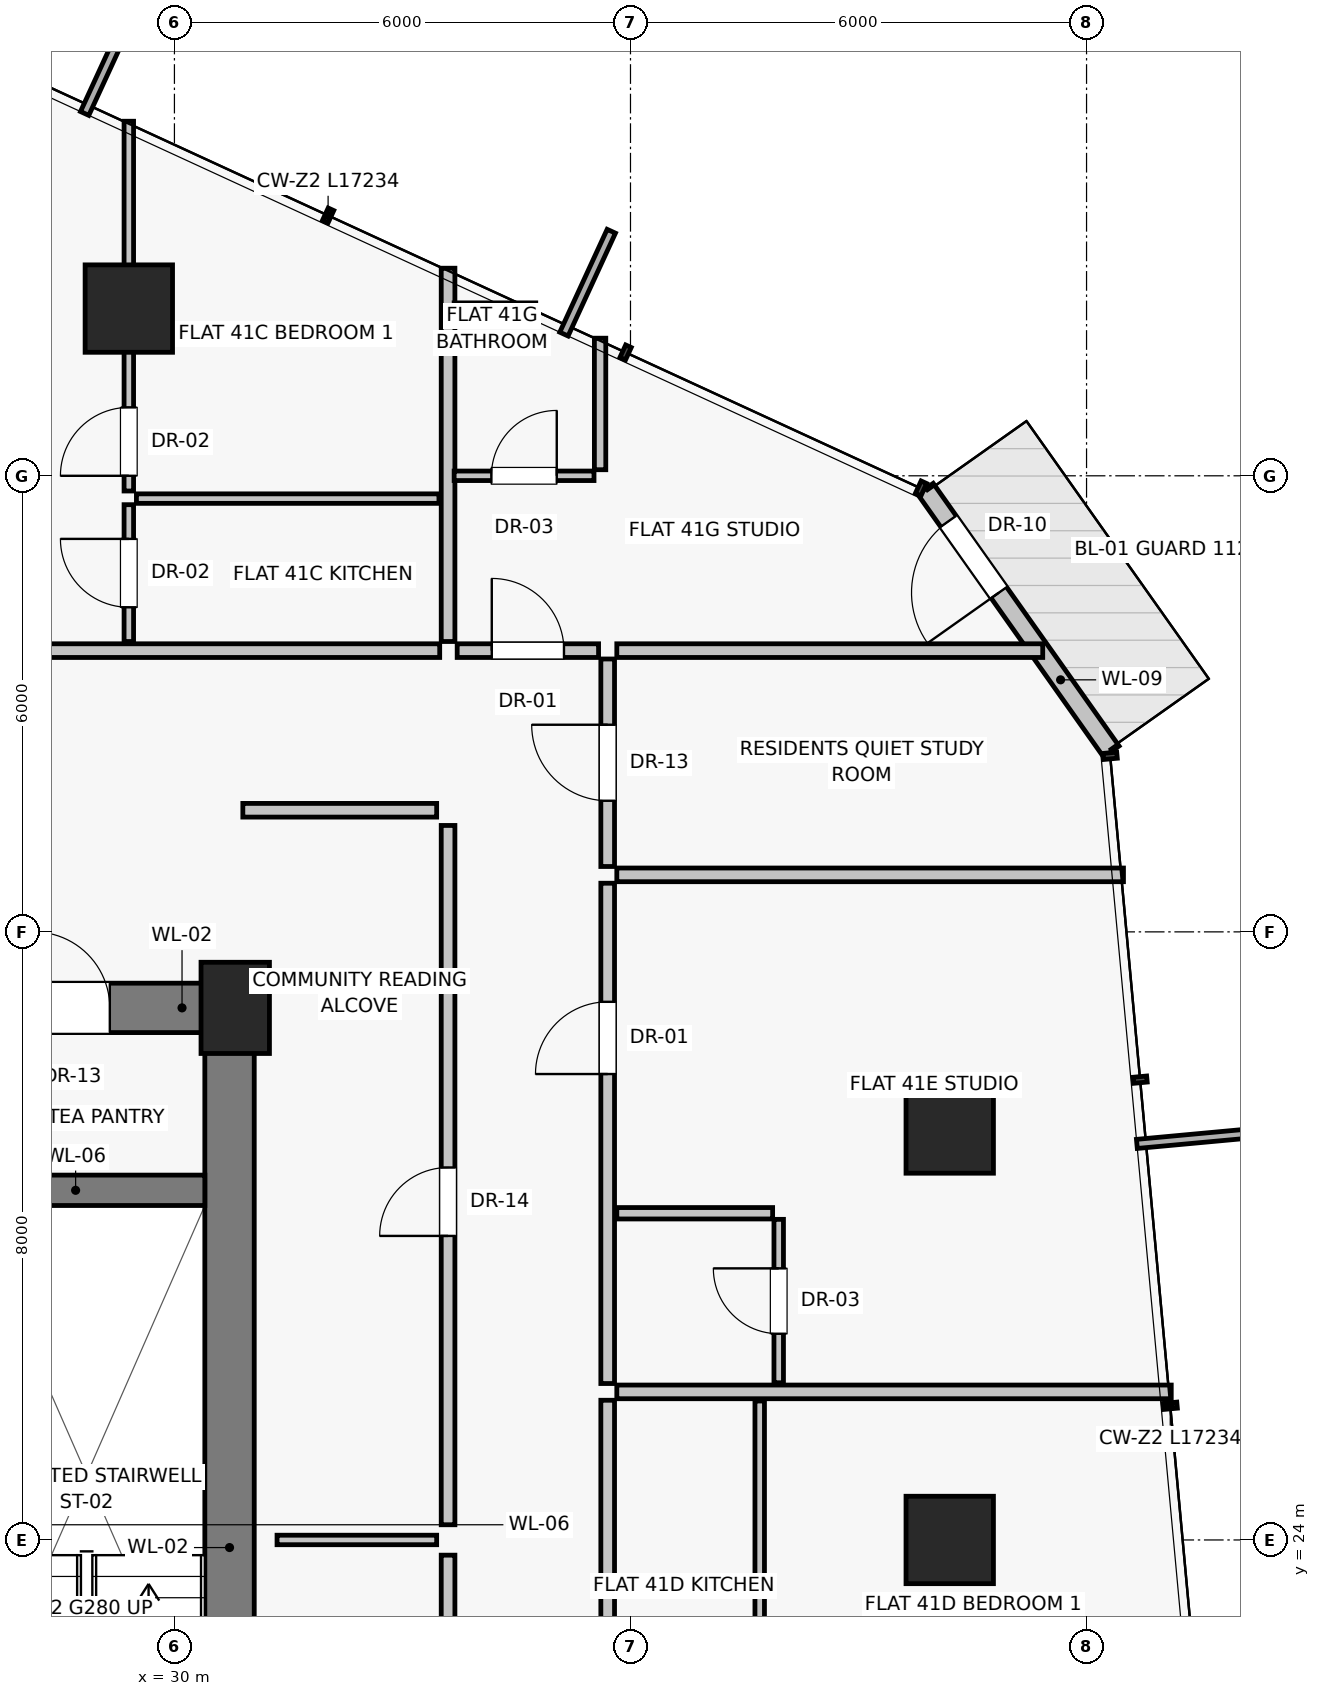
"""IFC4 building model, lengths in metres.
Left out: names, types, materials, properties, quantities, classifications, styles, units other than length and angle.
Written with IfcOpenShell. Run it as: python <this file> out.ifc"""

import sys

from ifc_helpers import new_model, si_unit, direction, frame, frame_2d, origin, origin_2d, place, context, subcontext, project, spatial, rectangle, extrude, source, transform, mapped, element, fill, save


model = new_model("IFC4")
c1 = context("Model", 3, precision=1e-05, world=origin(), true_north=direction((0.0, 1.0)))
c2 = subcontext(c1, "Body", "Model", "MODEL_VIEW")
j1 = project(units=[si_unit("LENGTHUNIT", "METRE"), si_unit("PLANEANGLEUNIT", "RADIAN")], contexts=[c1])
p1 = place(None, origin())
s1 = spatial("IfcSite", under=j1, at=p1, CompositionType="ELEMENT")
p2 = place(p1, origin())
s2 = spatial("IfcBuilding", under=s1, at=p2, CompositionType="ELEMENT")
p3 = place(p2, frame((0.0, 0.0, 145.75)))
s3 = spatial("IfcBuildingStorey", under=s2, at=p3, CompositionType="ELEMENT", Elevation=145.75)
p4 = place(p3, frame((30.8, 31.0, 0.0), z_axis=(0.0, 0.0, 1.0), x_axis=(1.0, 0.0, 0.0)))
e1 = element("IfcColumn", 1, at=p4, inside=s3, PredefinedType="PILASTER", context=c2, shape_type="SweptSolid", body=[
    extrude(rectangle(XDim=0.9, YDim=1.2, at=origin_2d()), origin(), (0.0, 0.0, 1.0), 3.25),
])
for number, where, z_axis, x_axis in (
    (2, (40.2, 24.0, 0.0), (0.0, 0.0, 1.0), (1.0, 0.0, 0.0)),
    (3, (40.2, 29.4, 0.0), (0.0, 0.0, 1.0), (1.0, 0.0, 0.0)),
    (4, (29.4, 40.2, 0.0), (0.0, 0.0, 1.0), (1.0, 0.0, 0.0)),
):
    element("IfcColumn", number, at=place(p3, frame(where, z_axis=z_axis, x_axis=x_axis)), inside=s3, PredefinedType="COLUMN", context=c2, shape_type="SweptSolid", body=[
        extrude(rectangle(XDim=1.15, YDim=1.15, at=origin_2d()), origin(), (0.0, 0.0, 1.0), 3.25),
    ])
p5 = place(p3, frame((42.326, 34.373, 0.0), z_axis=(0.0, 0.0, 1.0), x_axis=(-0.577577222035, 0.81633605371, 0.0)))
e5 = element("IfcWall", 5, at=p5, inside=s3, PredefinedType="SOLIDWALL", context=c2, shape_type="SweptSolid", body=[
    extrude(rectangle(XDim=4.233, YDim=0.25, at=frame_2d((2.117, 0.0))), origin(), (0.0, 0.0, 1.0), 3.0),
])
p6 = place(p5, frame((2.56, 0.0, 0.0)))
e6 = element("IfcOpeningElement", 6, at=p6, cuts=e5, PredefinedType="OPENING", context=c2, shape_type="SweptSolid", body=[
    extrude(rectangle(XDim=1.15, YDim=2.25, at=frame_2d((0.575, 1.125))), frame((0.0, 0.135, 0.0), z_axis=(0.0, -1.0, 0.0), x_axis=(1.0, 0.0, 0.0)), (0.0, 0.0, 1.0), 0.27),
])
p7 = place(p3, frame((30.725, 16.8, 0.0), z_axis=(0.0, 0.0, 1.0), x_axis=(0.0, 1.0, 0.0)))
e7 = element("IfcWall", 7, at=p7, inside=s3, PredefinedType="SHEAR", context=c2, shape_type="SweptSolid", body=[
    extrude(rectangle(XDim=14.2, YDim=0.65, at=frame_2d((7.1, 0.0))), origin(), (0.0, 0.0, 1.0), 3.0),
])
p8 = place(p3, frame((27.0, 31.0, 0.0), z_axis=(0.0, 0.0, 1.0), x_axis=(1.0, 0.0, 0.0)))
e8 = element("IfcWall", 8, at=p8, inside=s3, PredefinedType="SHEAR", context=c2, shape_type="SweptSolid", body=[
    extrude(rectangle(XDim=3.8, YDim=0.65, at=frame_2d((1.9, 0.0))), origin(), (0.0, 0.0, 1.0), 3.0),
])
p9 = place(p8, frame((1.15, 0.0, 0.0)))
e9 = element("IfcOpeningElement", 9, at=p9, cuts=e8, PredefinedType="OPENING", context=c2, shape_type="SweptSolid", body=[
    extrude(rectangle(XDim=1.0, YDim=2.01, at=frame_2d((0.5, 1.005))), frame((0.0, 0.335, 0.0), z_axis=(0.0, -1.0, 0.0), x_axis=(1.0, 0.0, 0.0)), (0.0, 0.0, 1.0), 0.67),
])
p10 = place(p3, frame((27.0, 28.6, 0.0), z_axis=(0.0, 0.0, 1.0), x_axis=(1.0, 0.0, 0.0)))
e10 = element("IfcWall", 10, at=p10, inside=s3, PredefinedType="SHEAR", context=c2, shape_type="SweptSolid", body=[
    extrude(rectangle(XDim=3.4, YDim=0.4, at=frame_2d((1.7, 0.0))), origin(), (0.0, 0.0, 1.0), 3.0),
])
p11 = place(p3, frame((33.6, 14.4, 0.0), z_axis=(0.0, 0.0, 1.0), x_axis=(0.0, 1.0, 0.0)))
e11 = element("IfcWall", 11, at=p11, inside=s3, PredefinedType="PARTITIONING", context=c2, shape_type="SweptSolid", body=[
    extrude(rectangle(XDim=9.4, YDim=0.18, at=frame_2d((4.7, 0.0))), origin(), (0.0, 0.0, 1.0), 3.0),
])
p12 = place(p11, frame((3.8, 0.0, 0.0)))
e12 = element("IfcOpeningElement", 12, at=p12, cuts=e11, PredefinedType="OPENING", context=c2, shape_type="SweptSolid", body=[
    extrude(rectangle(XDim=0.9, YDim=2.01, at=frame_2d((0.45, 1.005))), frame((0.0, 0.1, 0.0), z_axis=(0.0, -1.0, 0.0), x_axis=(1.0, 0.0, 0.0)), (0.0, 0.0, 1.0), 0.2),
])
p13 = place(p3, frame((33.6, 24.2, 0.0), z_axis=(0.0, 0.0, 1.0), x_axis=(0.0, 1.0, 0.0)))
e13 = element("IfcWall", 13, at=p13, inside=s3, PredefinedType="PARTITIONING", context=c2, shape_type="SweptSolid", body=[
    extrude(rectangle(XDim=9.2, YDim=0.18, at=frame_2d((4.6, 0.0))), origin(), (0.0, 0.0, 1.0), 3.0),
])
p14 = place(p13, frame((3.8, 0.0, 0.0)))
e14 = element("IfcOpeningElement", 14, at=p14, cuts=e13, PredefinedType="OPENING", context=c2, shape_type="SweptSolid", body=[
    extrude(rectangle(XDim=0.9, YDim=2.01, at=frame_2d((0.45, 1.005))), frame((0.0, 0.1, 0.0), z_axis=(0.0, -1.0, 0.0), x_axis=(1.0, 0.0, 0.0)), (0.0, 0.0, 1.0), 0.2),
])
p15 = place(p3, frame((31.35, 24.0, 0.0), z_axis=(0.0, 0.0, 1.0), x_axis=(1.0, 0.0, 0.0)))
e15 = element("IfcWall", 15, at=p15, inside=s3, PredefinedType="PARTITIONING", context=c2, shape_type="SweptSolid", body=[
    extrude(rectangle(XDim=2.1, YDim=0.125, at=frame_2d((1.05, 0.0))), origin(), (0.0, 0.0, 1.0), 3.0),
])
p16 = place(p3, frame((30.9, 33.6, 0.0), z_axis=(0.0, 0.0, 1.0), x_axis=(1.0, 0.0, 0.0)))
e16 = element("IfcWall", 16, at=p16, inside=s3, PredefinedType="PARTITIONING", context=c2, shape_type="SweptSolid", body=[
    extrude(rectangle(XDim=2.55, YDim=0.18, at=frame_2d((1.275, 0.0))), origin(), (0.0, 0.0, 1.0), 3.0),
])
p17 = place(p3, frame((33.6, 35.82, 0.0), z_axis=(0.0, 0.0, 1.0), x_axis=(0.0, 1.0, 0.0)))
e17 = element("IfcWall", 17, at=p17, inside=s3, PredefinedType="PARTITIONING", context=c2, shape_type="SweptSolid", body=[
    extrude(rectangle(XDim=4.911, YDim=0.18, at=frame_2d((2.456, 0.0))), origin(), (0.0, 0.0, 1.0), 3.0),
])
p18 = place(p3, frame((18.71, 35.7, 0.0), z_axis=(0.0, 0.0, 1.0), x_axis=(1.0, 0.0, 0.0)))
e18 = element("IfcWall", 18, at=p18, inside=s3, PredefinedType="PARTITIONING", context=c2, shape_type="SweptSolid", body=[
    extrude(rectangle(XDim=14.78, YDim=0.18, at=frame_2d((7.39, 0.0))), origin(), (0.0, 0.0, 1.0), 2.58),
])
p19 = place(p18, frame((5.94, 0.0, 0.0)))
e19 = element("IfcOpeningElement", 19, at=p19, cuts=e18, PredefinedType="OPENING", context=c2, shape_type="SweptSolid", body=[
    extrude(rectangle(XDim=0.95, YDim=2.02, at=frame_2d((0.475, 1.01))), frame((0.0, 0.1, 0.0), z_axis=(0.0, -1.0, 0.0), x_axis=(1.0, 0.0, 0.0)), (0.0, 0.0, 1.0), 0.2),
])
p20 = place(p3, frame((29.4, 35.82, 0.0), z_axis=(0.0, 0.0, 1.0), x_axis=(0.0, 1.0, 0.0)))
e20 = element("IfcWall", 20, at=p20, inside=s3, PredefinedType="PARTITIONING", context=c2, shape_type="SweptSolid", body=[
    extrude(rectangle(XDim=1.8, YDim=0.125, at=frame_2d((0.9, 0.0))), origin(), (0.0, 0.0, 1.0), 2.378),
])
p21 = place(p20, frame((0.45, 0.0, 0.0)))
e21 = element("IfcOpeningElement", 21, at=p21, cuts=e20, PredefinedType="OPENING", context=c2, shape_type="SweptSolid", body=[
    extrude(rectangle(XDim=0.9, YDim=2.01, at=frame_2d((0.45, 1.005))), frame((0.0, 0.073, 0.0), z_axis=(0.0, -1.0, 0.0), x_axis=(1.0, 0.0, 0.0)), (0.0, 0.0, 1.0), 0.145),
])
p22 = place(p3, frame((29.5, 37.7, 0.0), z_axis=(0.0, 0.0, 1.0), x_axis=(1.0, 0.0, 0.0)))
e22 = element("IfcWall", 22, at=p22, inside=s3, PredefinedType="PARTITIONING", context=c2, shape_type="SweptSolid", body=[
    extrude(rectangle(XDim=3.98, YDim=0.125, at=frame_2d((1.99, 0.0))), origin(), (0.0, 0.0, 1.0), 3.0),
])
p23 = place(p3, frame((29.4, 37.8, 0.0), z_axis=(0.0, 0.0, 1.0), x_axis=(0.0, 1.0, 0.0)))
e23 = element("IfcWall", 23, at=p23, inside=s3, PredefinedType="PARTITIONING", context=c2, shape_type="SweptSolid", body=[
    extrude(rectangle(XDim=4.865, YDim=0.125, at=frame_2d((2.432, 0.0))), origin(), (0.0, 0.0, 1.0), 2.378),
])
p24 = place(p23, frame((0.2, 0.0, 0.0)))
e24 = element("IfcOpeningElement", 24, at=p24, cuts=e23, PredefinedType="OPENING", context=c2, shape_type="SweptSolid", body=[
    extrude(rectangle(XDim=0.9, YDim=2.01, at=frame_2d((0.45, 1.005))), frame((0.0, 0.073, 0.0), z_axis=(0.0, -1.0, 0.0), x_axis=(1.0, 0.0, 0.0)), (0.0, 0.0, 1.0), 0.145),
])
p25 = place(p3, frame((35.82, 35.7, 0.0), z_axis=(0.0, 0.0, 1.0), x_axis=(1.0, 0.0, 0.0)))
e25 = element("IfcWall", 25, at=p25, inside=s3, PredefinedType="PARTITIONING", context=c2, shape_type="SweptSolid", body=[
    extrude(rectangle(XDim=5.604, YDim=0.18, at=frame_2d((2.802, 0.0))), origin(), (0.0, 0.0, 1.0), 3.0),
])
p26 = place(p3, frame((35.7, 12.21, 0.0), z_axis=(0.0, 0.0, 1.0), x_axis=(0.0, 1.0, 0.0)))
e26 = element("IfcWall", 26, at=p26, inside=s3, PredefinedType="PARTITIONING", context=c2, shape_type="SweptSolid", body=[
    extrude(rectangle(XDim=13.628, YDim=0.18, at=frame_2d((6.814, 0.0))), origin(), (0.0, 0.0, 1.0), 2.58),
])
p27 = place(p26, frame((4.348, 0.0, 0.0)))
e27 = element("IfcOpeningElement", 27, at=p27, cuts=e26, PredefinedType="OPENING", context=c2, shape_type="SweptSolid", body=[
    extrude(rectangle(XDim=0.95, YDim=2.02, at=frame_2d((0.475, 1.01))), frame((0.0, 0.1, 0.0), z_axis=(0.0, -1.0, 0.0), x_axis=(1.0, 0.0, 0.0)), (0.0, 0.0, 1.0), 0.2),
])
p28 = place(p3, frame((37.7, 19.816, 0.0), z_axis=(0.0, 0.0, 1.0), x_axis=(0.0, 1.0, 0.0)))
e28 = element("IfcWall", 28, at=p28, inside=s3, PredefinedType="PARTITIONING", context=c2, shape_type="SweptSolid", body=[
    extrude(rectangle(XDim=6.012, YDim=0.125, at=frame_2d((3.006, 0.0))), origin(), (0.0, 0.0, 1.0), 3.0),
])
p29 = place(p3, frame((35.82, 25.948, 0.0), z_axis=(0.0, 0.0, 1.0), x_axis=(1.0, 0.0, 0.0)))
e29 = element("IfcWall", 29, at=p29, inside=s3, PredefinedType="PARTITIONING", context=c2, shape_type="SweptSolid", body=[
    extrude(rectangle(XDim=7.294, YDim=0.18, at=frame_2d((3.647, 0.0))), origin(), (0.0, 0.0, 1.0), 3.0),
])
p30 = place(p3, frame((35.7, 32.86, 0.0), z_axis=(0.0, 0.0, 1.0), x_axis=(0.0, 1.0, 0.0)))
e30 = element("IfcWall", 30, at=p30, inside=s3, PredefinedType="PARTITIONING", context=c2, shape_type="SweptSolid", body=[
    extrude(rectangle(XDim=2.73, YDim=0.18, at=frame_2d((1.365, 0.0))), origin(), (0.0, 0.0, 1.0), 3.0),
])
p31 = place(p30, frame((0.865, 0.0, 0.0)))
e31 = element("IfcOpeningElement", 31, at=p31, cuts=e30, PredefinedType="OPENING", context=c2, shape_type="SweptSolid", body=[
    extrude(rectangle(XDim=1.0, YDim=2.01, at=frame_2d((0.5, 1.005))), frame((0.0, 0.1, 0.0), z_axis=(0.0, -1.0, 0.0), x_axis=(1.0, 0.0, 0.0)), (0.0, 0.0, 1.0), 0.2),
])
p32 = place(p3, frame((35.82, 32.75, 0.0), z_axis=(0.0, 0.0, 1.0), x_axis=(1.0, 0.0, 0.0)))
e32 = element("IfcWall", 32, at=p32, inside=s3, PredefinedType="PARTITIONING", context=c2, shape_type="SweptSolid", body=[
    extrude(rectangle(XDim=6.666, YDim=0.18, at=frame_2d((3.333, 0.0))), origin(), (0.0, 0.0, 1.0), 3.0),
])
p33 = place(p3, frame((35.7, 26.058, 0.0), z_axis=(0.0, 0.0, 1.0), x_axis=(0.0, 1.0, 0.0)))
e33 = element("IfcWall", 33, at=p33, inside=s3, PredefinedType="PARTITIONING", context=c2, shape_type="SweptSolid", body=[
    extrude(rectangle(XDim=6.582, YDim=0.18, at=frame_2d((3.291, 0.0))), origin(), (0.0, 0.0, 1.0), 2.58),
])
p34 = place(p33, frame((4.072, 0.0, 0.0)))
e34 = element("IfcOpeningElement", 34, at=p34, cuts=e33, PredefinedType="OPENING", context=c2, shape_type="SweptSolid", body=[
    extrude(rectangle(XDim=0.95, YDim=2.02, at=frame_2d((0.475, 1.01))), frame((0.0, 0.1, 0.0), z_axis=(0.0, -1.0, 0.0), x_axis=(1.0, 0.0, 0.0)), (0.0, 0.0, 1.0), 0.2),
])
p35 = place(p3, frame((35.82, 28.298, 0.0), z_axis=(0.0, 0.0, 1.0), x_axis=(1.0, 0.0, 0.0)))
e35 = element("IfcWall", 35, at=p35, inside=s3, PredefinedType="PARTITIONING", context=c2, shape_type="SweptSolid", body=[
    extrude(rectangle(XDim=2.05, YDim=0.15, at=frame_2d((1.025, 0.0))), origin(), (0.0, 0.0, 1.0), 3.0),
])
p36 = place(p3, frame((37.95, 26.068, 0.0), z_axis=(0.0, 0.0, 1.0), x_axis=(0.0, 1.0, 0.0)))
e36 = element("IfcWall", 36, at=p36, inside=s3, PredefinedType="PARTITIONING", context=c2, shape_type="SweptSolid", body=[
    extrude(rectangle(XDim=2.15, YDim=0.125, at=frame_2d((1.075, 0.0))), origin(), (0.0, 0.0, 1.0), 3.0),
])
p37 = place(p36, frame((0.645, 0.0, 0.0)))
e37 = element("IfcOpeningElement", 37, at=p37, cuts=e36, PredefinedType="OPENING", context=c2, shape_type="SweptSolid", body=[
    extrude(rectangle(XDim=0.86, YDim=2.01, at=frame_2d((0.43, 1.005))), frame((0.0, 0.073, 0.0), z_axis=(0.0, -1.0, 0.0), x_axis=(1.0, 0.0, 0.0)), (0.0, 0.0, 1.0), 0.145),
])
p38 = place(p3, frame((33.72, 35.7, 0.0), z_axis=(0.0, 0.0, 1.0), x_axis=(1.0, 0.0, 0.0)))
e38 = element("IfcWall", 38, at=p38, inside=s3, PredefinedType="PARTITIONING", context=c2, shape_type="SweptSolid", body=[
    extrude(rectangle(XDim=1.86, YDim=0.18, at=frame_2d((0.93, 0.0))), origin(), (0.0, 0.0, 1.0), 3.0),
])
p39 = place(p38, frame((0.455, 0.0, 0.0)))
e39 = element("IfcOpeningElement", 39, at=p39, cuts=e38, PredefinedType="OPENING", context=c2, shape_type="SweptSolid", body=[
    extrude(rectangle(XDim=0.95, YDim=2.02, at=frame_2d((0.475, 1.01))), frame((0.0, 0.1, 0.0), z_axis=(0.0, -1.0, 0.0), x_axis=(1.0, 0.0, 0.0)), (0.0, 0.0, 1.0), 0.2),
])
p40 = place(p3, frame((33.68, 38.0, 0.0), z_axis=(0.0, 0.0, 1.0), x_axis=(1.0, 0.0, 0.0)))
e40 = element("IfcWall", 40, at=p40, inside=s3, PredefinedType="PARTITIONING", context=c2, shape_type="SweptSolid", body=[
    extrude(rectangle(XDim=1.84, YDim=0.125, at=frame_2d((0.92, 0.0))), origin(), (0.0, 0.0, 1.0), 3.0),
])
p41 = place(p40, frame((0.49, 0.0, 0.0)))
e41 = element("IfcOpeningElement", 41, at=p41, cuts=e40, PredefinedType="OPENING", context=c2, shape_type="SweptSolid", body=[
    extrude(rectangle(XDim=0.86, YDim=2.01, at=frame_2d((0.43, 1.005))), frame((0.0, 0.073, 0.0), z_axis=(0.0, -1.0, 0.0), x_axis=(1.0, 0.0, 0.0)), (0.0, 0.0, 1.0), 0.145),
])
p42 = place(p3, frame((33.68, 40.2, 0.0), z_axis=(0.0, 0.0, 1.0), x_axis=(1.0, 0.0, 0.0)))
e42 = element("IfcWall", 42, at=p42, inside=s3, PredefinedType="PARTITIONING", context=c2, shape_type="SweptSolid", body=[
    extrude(rectangle(XDim=1.074, YDim=0.15, at=frame_2d((0.537, 0.0))), origin(), (0.0, 0.0, 1.0), 3.0),
])
p43 = place(p3, frame((35.6, 38.08, 0.0), z_axis=(0.0, 0.0, 1.0), x_axis=(0.0, 1.0, 0.0)))
e43 = element("IfcWall", 43, at=p43, inside=s3, PredefinedType="PARTITIONING", context=c2, shape_type="SweptSolid", body=[
    extrude(rectangle(XDim=1.73, YDim=0.15, at=frame_2d((0.865, 0.0))), origin(), (0.0, 0.0, 1.0), 3.0),
])
m1 = source(origin(), c2, "Body", "SweptSolid", [
    extrude(rectangle(XDim=1.15, YDim=2.25, at=frame_2d((0.575, 1.125))), frame((0.0, 0.025, 0.0), z_axis=(0.0, -1.0, 0.0), x_axis=(1.0, 0.0, 0.0)), (0.0, 0.0, 1.0), 0.05),
])
p44 = place(p6, frame((1.15, 0.0, 0.0), z_axis=(0.0, 0.0, 1.0), x_axis=(-1.0, 0.0, 0.0)))
e44 = element("IfcDoor", 44, at=p44, inside=s3, OperationType="SINGLE_SWING_LEFT", PredefinedType="DOOR", context=c2, shape_type="MappedRepresentation", body=[
    mapped(m1, transform((0.0, 0.0, 0.0), scale=1.0)),
])
fill(e6, e44)
m2 = source(origin(), c2, "Body", "SweptSolid", [
    extrude(rectangle(XDim=1.0, YDim=2.01, at=frame_2d((0.5, 1.005))), frame((0.0, 0.025, 0.0), z_axis=(0.0, -1.0, 0.0), x_axis=(1.0, 0.0, 0.0)), (0.0, 0.0, 1.0), 0.05),
])
p45 = place(p9, origin())
e45 = element("IfcDoor", 45, at=p45, inside=s3, OperationType="SINGLE_SWING_LEFT", PredefinedType="DOOR", context=c2, shape_type="MappedRepresentation", body=[
    mapped(m2, transform((0.0, 0.0, 0.0), scale=1.0)),
])
fill(e9, e45)
m3 = source(origin(), c2, "Body", "SweptSolid", [
    extrude(rectangle(XDim=0.9, YDim=2.01, at=frame_2d((0.45, 1.005))), frame((0.0, 0.025, 0.0), z_axis=(0.0, -1.0, 0.0), x_axis=(1.0, 0.0, 0.0)), (0.0, 0.0, 1.0), 0.05),
])
p46 = place(p14, origin())
e46 = element("IfcDoor", 46, at=p46, inside=s3, OperationType="SINGLE_SWING_LEFT", PredefinedType="DOOR", context=c2, shape_type="MappedRepresentation", body=[
    mapped(m3, transform((0.0, 0.0, 0.0), scale=1.0)),
])
fill(e14, e46)
p47 = place(p21, origin())
e47 = element("IfcDoor", 47, at=p47, inside=s3, OperationType="SINGLE_SWING_RIGHT", PredefinedType="DOOR", context=c2, shape_type="MappedRepresentation", body=[
    mapped(m3, transform((0.0, 0.0, 0.0), scale=1.0)),
])
fill(e21, e47)
p48 = place(p24, origin())
e48 = element("IfcDoor", 48, at=p48, inside=s3, OperationType="SINGLE_SWING_LEFT", PredefinedType="DOOR", context=c2, shape_type="MappedRepresentation", body=[
    mapped(m3, transform((0.0, 0.0, 0.0), scale=1.0)),
])
fill(e24, e48)
p49 = place(p31, origin())
e49 = element("IfcDoor", 49, at=p49, inside=s3, OperationType="SINGLE_SWING_RIGHT", PredefinedType="DOOR", context=c2, shape_type="MappedRepresentation", body=[
    mapped(m2, transform((0.0, 0.0, 0.0), scale=1.0)),
])
fill(e31, e49)
m4 = source(origin(), c2, "Body", "SweptSolid", [
    extrude(rectangle(XDim=0.95, YDim=2.02, at=frame_2d((0.475, 1.01))), frame((0.0, 0.025, 0.0), z_axis=(0.0, -1.0, 0.0), x_axis=(1.0, 0.0, 0.0)), (0.0, 0.0, 1.0), 0.05),
])
p50 = place(p34, origin())
e50 = element("IfcDoor", 50, at=p50, inside=s3, OperationType="SINGLE_SWING_LEFT", PredefinedType="DOOR", context=c2, shape_type="MappedRepresentation", body=[
    mapped(m4, transform((0.0, 0.0, 0.0), scale=1.0)),
])
fill(e34, e50)
m5 = source(origin(), c2, "Body", "SweptSolid", [
    extrude(rectangle(XDim=0.86, YDim=2.01, at=frame_2d((0.43, 1.005))), frame((0.0, 0.025, 0.0), z_axis=(0.0, -1.0, 0.0), x_axis=(1.0, 0.0, 0.0)), (0.0, 0.0, 1.0), 0.05),
])
p51 = place(p37, origin())
e51 = element("IfcDoor", 51, at=p51, inside=s3, OperationType="SINGLE_SWING_RIGHT", PredefinedType="DOOR", context=c2, shape_type="MappedRepresentation", body=[
    mapped(m5, transform((0.0, 0.0, 0.0), scale=1.0)),
])
fill(e37, e51)
p52 = place(p39, origin())
e52 = element("IfcDoor", 52, at=p52, inside=s3, OperationType="SINGLE_SWING_LEFT", PredefinedType="DOOR", context=c2, shape_type="MappedRepresentation", body=[
    mapped(m4, transform((0.0, 0.0, 0.0), scale=1.0)),
])
fill(e39, e52)
p53 = place(p41, origin())
e53 = element("IfcDoor", 53, at=p53, inside=s3, OperationType="SINGLE_SWING_RIGHT", PredefinedType="DOOR", context=c2, shape_type="MappedRepresentation", body=[
    mapped(m5, transform((0.0, 0.0, 0.0), scale=1.0)),
])
fill(e41, e53)
save(model, sys.argv[1])
